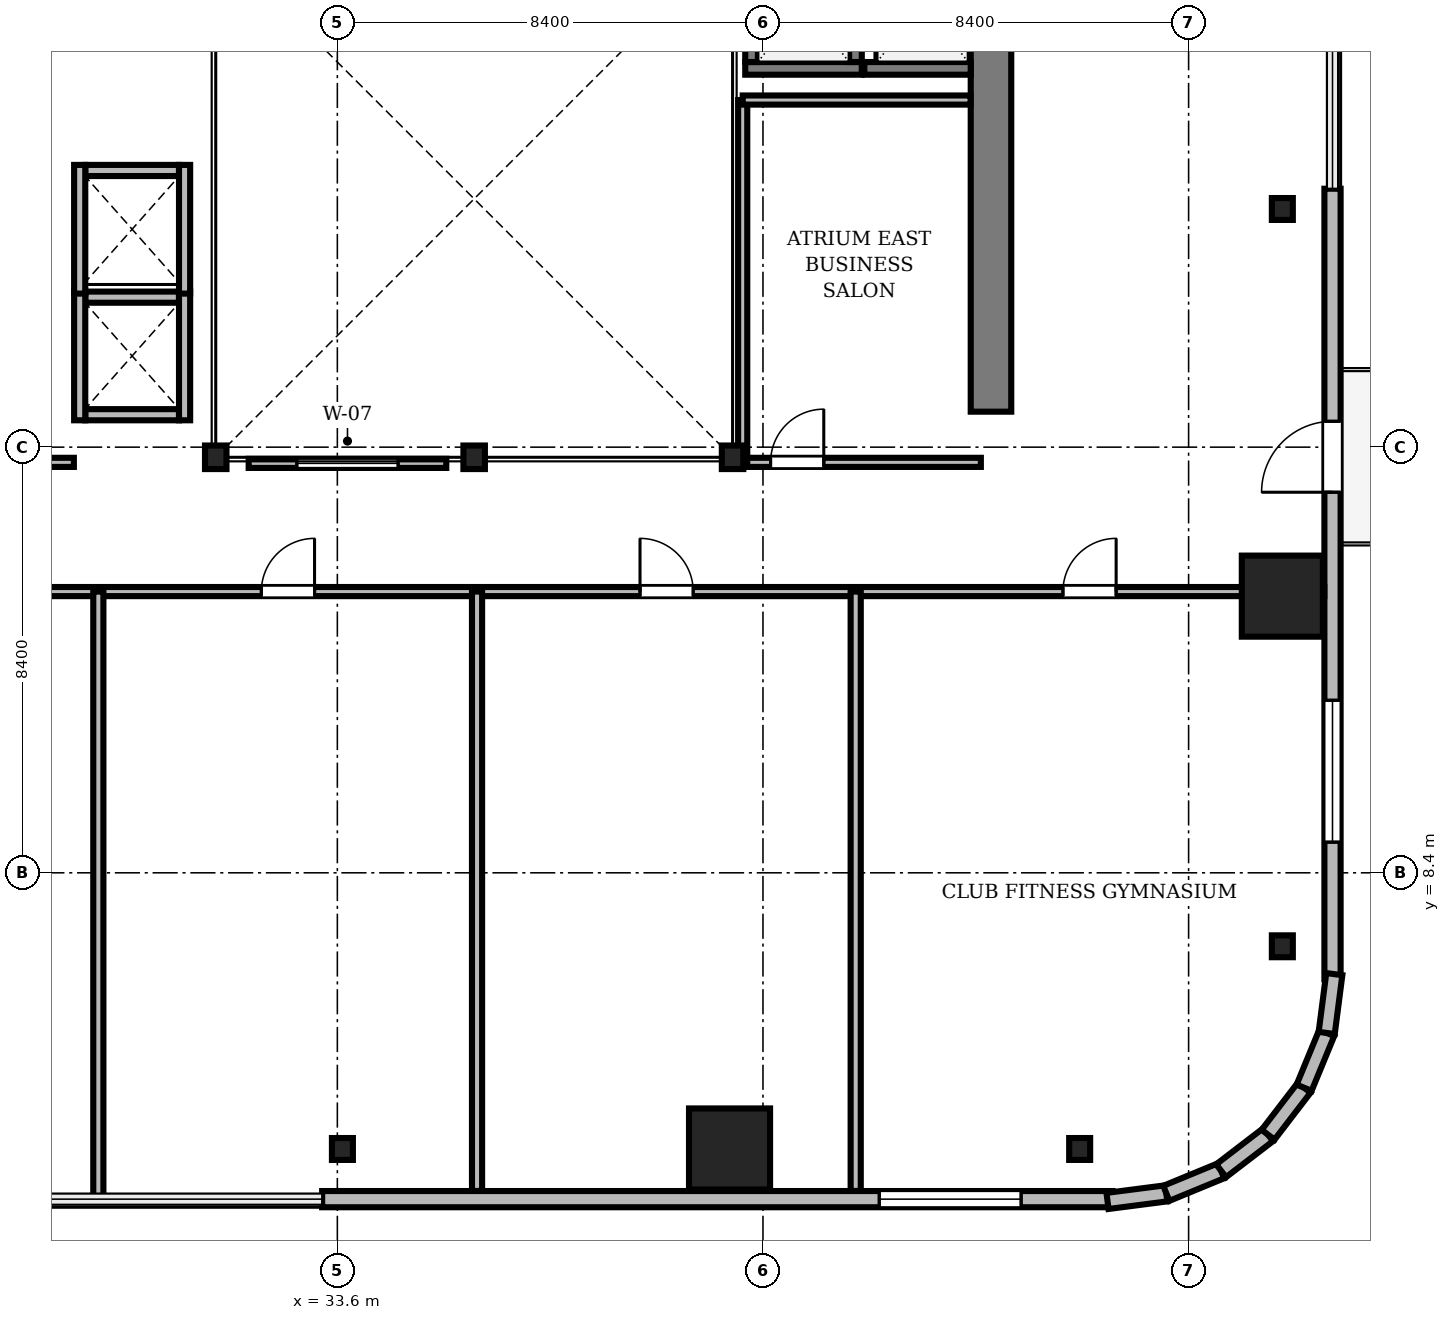
"""IFC4 building model, lengths in metres.
Left out: names, types, materials, properties, quantities, classifications, styles, units other than length and angle.
Written with IfcOpenShell. Run it as: python <this file> out.ifc"""

import sys

from ifc_helpers import new_model, si_unit, direction, frame, frame_2d, origin, origin_2d, place, context, subcontext, project, spatial, rectangle, i_section, extrude, source, transform, mapped, element, fill, save


model = new_model("IFC4")
c1 = context("Model", 3, precision=1e-05, world=origin(), true_north=direction((0.0, 1.0)))
c2 = subcontext(c1, "Body", "Model", "MODEL_VIEW")
j1 = project(units=[si_unit("LENGTHUNIT", "METRE"), si_unit("PLANEANGLEUNIT", "RADIAN")], contexts=[c1])
p1 = place(None, origin())
s1 = spatial("IfcSite", under=j1, at=p1, CompositionType="ELEMENT")
p2 = place(p1, origin())
s2 = spatial("IfcBuilding", under=s1, at=p2, CompositionType="ELEMENT")
p3 = place(p2, frame((0.0, 0.0, 118.7)))
s3 = spatial("IfcBuildingStorey", under=s2, at=p3, CompositionType="ELEMENT", Elevation=118.7)
m1 = source(origin(), c2, "Body", "SweptSolid", [
    extrude(rectangle(XDim=13.15, YDim=0.8, at=frame_2d((6.575, 0.0))), origin(), (0.0, 0.0, 1.0), 3.46),
])
p4 = place(p3, frame((46.5, 17.5, 0.0), z_axis=(0.0, 0.0, 1.0), x_axis=(0.0, 1.0, 0.0)))
e1 = element("IfcWall", 1, at=p4, inside=s3, PredefinedType="SHEAR", context=c2, shape_type="MappedRepresentation", body=[
    mapped(m1, transform((0.0, 0.0, 0.0), scale=1.0)),
])
m2 = source(origin(), c2, "Body", "SweptSolid", [
    extrude(i_section(OverallWidth=0.424, OverallDepth=0.465, WebThickness=0.035, FlangeThickness=0.056, FilletRadius=0.015, at=origin_2d()), origin(), (0.0, 0.0, 1.0), 3.46),
])
for number, where, z_axis, x_axis in (
    (2, (31.2, 16.6, 0.0), (0.0, 0.0, 1.0), (1.0, 0.0, 0.0)),
    (3, (36.3, 16.6, 0.0), (0.0, 0.0, 1.0), (1.0, 0.0, 0.0)),
    (4, (41.4, 16.6, 0.0), (0.0, 0.0, 1.0), (1.0, 0.0, 0.0)),
):
    element("IfcColumn", number, at=place(p3, frame(where, z_axis=z_axis, x_axis=x_axis)), inside=s3, PredefinedType="COLUMN", context=c2, shape_type="MappedRepresentation", body=[
        mapped(m2, transform((0.0, 0.0, 0.0), scale=1.0)),
    ])
m3 = source(origin(), c2, "Body", "SweptSolid", [
    extrude(rectangle(XDim=1.6, YDim=1.6, at=origin_2d()), origin(), (0.0, 0.0, 1.0), 3.46),
])
for number, where, z_axis, x_axis in (
    (5, (41.34, 2.95, 0.0), (0.0, 0.0, 1.0), (1.0, 0.0, 0.0)),
    (6, (52.25, 13.86, 0.0), (0.0, 0.0, 1.0), (1.0, 0.0, 0.0)),
):
    element("IfcColumn", number, at=place(p3, frame(where, z_axis=z_axis, x_axis=x_axis)), inside=s3, PredefinedType="COLUMN", context=c2, shape_type="MappedRepresentation", body=[
        mapped(m3, transform((0.0, 0.0, 0.0), scale=1.0)),
    ])
m4 = source(origin(), c2, "Body", "SweptSolid", [
    extrude(i_section(OverallWidth=0.414, OverallDepth=0.432, WebThickness=0.026, FlangeThickness=0.04, FilletRadius=0.015, at=origin_2d()), origin(), (0.0, 0.0, 1.0), 3.46),
])
for number, where, z_axis, x_axis in (
    (7, (33.7, 2.95, 0.0), (0.0, 0.0, 1.0), (1.0, 0.0, 0.0)),
    (8, (48.25, 2.95, 0.0), (0.0, 0.0, 1.0), (1.0, 0.0, 0.0)),
    (9, (52.25, 6.95, 0.0), (0.0, 0.0, 1.0), (1.0, 0.0, 0.0)),
    (10, (52.25, 21.5, 0.0), (0.0, 0.0, 1.0), (1.0, 0.0, 0.0)),
):
    element("IfcColumn", number, at=place(p3, frame(where, z_axis=z_axis, x_axis=x_axis)), inside=s3, PredefinedType="COLUMN", context=c2, shape_type="MappedRepresentation", body=[
        mapped(m4, transform((0.0, 0.0, 0.0), scale=1.0)),
    ])
m5 = source(origin(), c2, "Body", "SweptSolid", [
    extrude(rectangle(XDim=15.6, YDim=0.32, at=frame_2d((7.8, 0.0))), origin(), (0.0, 0.0, 1.0), 3.46),
])
p5 = place(p3, frame((33.3, 1.96, 0.0), z_axis=(0.0, 0.0, 1.0), x_axis=(1.0, 0.0, 0.0)))
e11 = element("IfcWall", 11, at=p5, inside=s3, PredefinedType="SOLIDWALL", context=c2, shape_type="MappedRepresentation", body=[
    mapped(m5, transform((0.0, 0.0, 0.0), scale=1.0)),
])
m6 = source(origin(), c2, "Body", "SweptSolid", [
    extrude(rectangle(XDim=2.8, YDim=2.4, at=frame_2d((1.4, 1.2))), frame((0.0, 0.17, 0.0), z_axis=(0.0, -1.0, 0.0), x_axis=(1.0, 0.0, 0.0)), (0.0, 0.0, 1.0), 0.34),
])
p6 = place(p5, frame((10.995, 0.0, 0.72)))
e12 = element("IfcOpeningElement", 12, at=p6, cuts=e11, PredefinedType="OPENING", context=c2, shape_type="MappedRepresentation", body=[
    mapped(m6, transform((0.0, 0.0, 0.0), scale=1.0)),
])
p7 = place(p3, frame((53.24, 6.3, 0.0), z_axis=(0.0, 0.0, 1.0), x_axis=(0.0, 1.0, 0.0)))
e13 = element("IfcWall", 13, at=p7, inside=s3, PredefinedType="SOLIDWALL", context=c2, shape_type="MappedRepresentation", body=[
    mapped(m5, transform((0.0, 0.0, 0.0), scale=1.0)),
])
m7 = source(origin(), c2, "Body", "SweptSolid", [
    extrude(rectangle(XDim=1.4, YDim=2.3, at=frame_2d((0.7, 1.15))), frame((0.0, 0.17, 0.0), z_axis=(0.0, -1.0, 0.0), x_axis=(1.0, 0.0, 0.0)), (0.0, 0.0, 1.0), 0.34),
])
p8 = place(p7, frame((9.61, 0.0, 0.0)))
e14 = element("IfcOpeningElement", 14, at=p8, cuts=e13, PredefinedType="OPENING", context=c2, shape_type="MappedRepresentation", body=[
    mapped(m7, transform((0.0, 0.0, 0.0), scale=1.0)),
])
p9 = place(p7, frame((2.705, 0.0, 0.72)))
e15 = element("IfcOpeningElement", 15, at=p9, cuts=e13, PredefinedType="OPENING", context=c2, shape_type="MappedRepresentation", body=[
    mapped(m6, transform((0.0, 0.0, 0.0), scale=1.0)),
])
m8 = source(origin(), c2, "Body", "SweptSolid", [
    extrude(rectangle(XDim=1.17, YDim=0.32, at=frame_2d((0.585, 0.0))), origin(), (0.0, 0.0, 1.0), 3.46),
])
p10 = place(p3, frame((48.8, 1.925, 0.0), z_axis=(0.0, 0.0, 1.0), x_axis=(0.991762485493, 0.128090485085, 0.0)))
e16 = element("IfcWall", 16, at=p10, inside=s3, PredefinedType="SOLIDWALL", context=c2, shape_type="MappedRepresentation", body=[
    mapped(m8, transform((0.0, 0.0, 0.0), scale=1.0)),
])
m9 = source(origin(), c2, "Body", "SweptSolid", [
    extrude(rectangle(XDim=1.169, YDim=0.32, at=frame_2d((0.585, 0.0))), origin(), (0.0, 0.0, 1.0), 3.46),
])
p11 = place(p3, frame((49.96, 2.074, 0.0), z_axis=(0.0, 0.0, 1.0), x_axis=(0.924479075121, 0.381232789334, 0.0)))
e17 = element("IfcWall", 17, at=p11, inside=s3, PredefinedType="SOLIDWALL", context=c2, shape_type="MappedRepresentation", body=[
    mapped(m9, transform((0.0, 0.0, 0.0), scale=1.0)),
])
m10 = source(origin(), c2, "Body", "SweptSolid", [
    extrude(rectangle(XDim=1.169, YDim=0.32, at=frame_2d((0.584, 0.0))), origin(), (0.0, 0.0, 1.0), 3.46),
])
p12 = place(p3, frame((51.041, 2.52, 0.0), z_axis=(0.0, 0.0, 1.0), x_axis=(0.793663520347, 0.608356981114, 0.0)))
e18 = element("IfcWall", 18, at=p12, inside=s3, PredefinedType="SOLIDWALL", context=c2, shape_type="MappedRepresentation", body=[
    mapped(m10, transform((0.0, 0.0, 0.0), scale=1.0)),
])
m11 = source(origin(), c2, "Body", "SweptSolid", [
    extrude(rectangle(XDim=1.169, YDim=0.32, at=frame_2d((0.584, 0.0))), origin(), (0.0, 0.0, 1.0), 3.46),
])
for number, where, z_axis, x_axis in (
    (19, (51.969, 3.231, 0.0), (0.0, 0.0, 1.0), (0.608, 0.794, 0.0)),
    (20, (52.68, 4.159, 0.0), (0.0, 0.0, 1.0), (0.381, 0.925, 0.0)),
):
    element("IfcWall", number, at=place(p3, frame(where, z_axis=z_axis, x_axis=x_axis)), inside=s3, PredefinedType="SOLIDWALL", context=c2, shape_type="MappedRepresentation", body=[
        mapped(m11, transform((0.0, 0.0, 0.0), scale=1.0)),
    ])
m12 = source(origin(), c2, "Body", "SweptSolid", [
    extrude(rectangle(XDim=1.171, YDim=0.32, at=frame_2d((0.585, 0.0))), origin(), (0.0, 0.0, 1.0), 3.46),
])
p13 = place(p3, frame((53.125, 5.24, 0.0), z_axis=(0.0, 0.0, 1.0), x_axis=(0.128269133229, 0.991739395941, 0.0)))
e21 = element("IfcWall", 21, at=p13, inside=s3, PredefinedType="SOLIDWALL", context=c2, shape_type="MappedRepresentation", body=[
    mapped(m12, transform((0.0, 0.0, 0.0), scale=1.0)),
])
m13 = source(origin(), c2, "Body", "SweptSolid", [
    extrude(rectangle(XDim=1.85, YDim=0.22, at=frame_2d((0.925, 0.0))), origin(), (0.0, 0.0, 1.0), 3.46),
])
for number, where, z_axis, x_axis in (
    (22, (28.625, 17.44, 0.0), (0.0, 0.0, 1.0), (1.0, 0.0, 0.0)),
    (23, (28.625, 19.76, 0.0), (0.0, 0.0, 1.0), (1.0, 0.0, 0.0)),
):
    element("IfcWall", number, at=place(p3, frame(where, z_axis=z_axis, x_axis=x_axis)), inside=s3, PredefinedType="SOLIDWALL", context=c2, shape_type="MappedRepresentation", body=[
        mapped(m13, transform((0.0, 0.0, 0.0), scale=1.0)),
    ])
m14 = source(origin(), c2, "Body", "SweptSolid", [
    extrude(rectangle(XDim=2.54, YDim=0.22, at=frame_2d((1.27, 0.0))), origin(), (0.0, 0.0, 1.0), 3.46),
])
for number, where, z_axis, x_axis in (
    (24, (28.515, 17.33, 0.0), (0.0, 0.0, 1.0), (0.0, 1.0, 0.0)),
    (25, (30.585, 17.33, 0.0), (0.0, 0.0, 1.0), (0.0, 1.0, 0.0)),
):
    element("IfcWall", number, at=place(p3, frame(where, z_axis=z_axis, x_axis=x_axis)), inside=s3, PredefinedType="SOLIDWALL", context=c2, shape_type="MappedRepresentation", body=[
        mapped(m14, transform((0.0, 0.0, 0.0), scale=1.0)),
    ])
p14 = place(p3, frame((28.625, 22.26, 0.0), z_axis=(0.0, 0.0, 1.0), x_axis=(1.0, 0.0, 0.0)))
e26 = element("IfcWall", 26, at=p14, inside=s3, PredefinedType="SOLIDWALL", context=c2, shape_type="MappedRepresentation", body=[
    mapped(m13, transform((0.0, 0.0, 0.0), scale=1.0)),
])
for number, where, z_axis, x_axis in (
    (27, (28.515, 19.83, 0.0), (0.0, 0.0, 1.0), (0.0, 1.0, 0.0)),
    (28, (30.585, 19.83, 0.0), (0.0, 0.0, 1.0), (0.0, 1.0, 0.0)),
):
    element("IfcWall", number, at=place(p3, frame(where, z_axis=z_axis, x_axis=x_axis)), inside=s3, PredefinedType="SOLIDWALL", context=c2, shape_type="MappedRepresentation", body=[
        mapped(m14, transform((0.0, 0.0, 0.0), scale=1.0)),
    ])
m15 = source(origin(), c2, "Body", "SweptSolid", [
    extrude(rectangle(XDim=2.3, YDim=0.25, at=frame_2d((1.15, 0.0))), origin(), (0.0, 0.0, 1.0), 3.46),
])
for number, where, z_axis, x_axis in (
    (29, (41.65, 24.275, 0.0), (0.0, 0.0, 1.0), (1.0, 0.0, 0.0)),
    (30, (41.775, 24.4, 0.0), (0.0, 0.0, 1.0), (0.0, 1.0, 0.0)),
    (31, (43.825, 24.4, 0.0), (0.0, 0.0, 1.0), (0.0, 1.0, 0.0)),
):
    element("IfcWall", number, at=place(p3, frame(where, z_axis=z_axis, x_axis=x_axis)), inside=s3, PredefinedType="SOLIDWALL", context=c2, shape_type="MappedRepresentation", body=[
        mapped(m15, transform((0.0, 0.0, 0.0), scale=1.0)),
    ])
m16 = source(origin(), c2, "Body", "SweptSolid", [
    extrude(rectangle(XDim=2.1, YDim=0.25, at=frame_2d((1.05, 0.0))), origin(), (0.0, 0.0, 1.0), 3.46),
])
p15 = place(p3, frame((44.0, 24.275, 0.0), z_axis=(0.0, 0.0, 1.0), x_axis=(1.0, 0.0, 0.0)))
e32 = element("IfcWall", 32, at=p15, inside=s3, PredefinedType="SOLIDWALL", context=c2, shape_type="MappedRepresentation", body=[
    mapped(m16, transform((0.0, 0.0, 0.0), scale=1.0)),
])
m17 = source(origin(), c2, "Body", "SweptSolid", [
    extrude(rectangle(XDim=46.156, YDim=0.18, at=frame_2d((23.078, 0.0))), origin(), (0.0, 0.0, 1.0), 2.702),
])
p16 = place(p3, frame((6.922, 13.95, 0.0), z_axis=(0.0, 0.0, 1.0), x_axis=(1.0, 0.0, 0.0)))
e33 = element("IfcWall", 33, at=p16, inside=s3, PredefinedType="PARTITIONING", context=c2, shape_type="MappedRepresentation", body=[
    mapped(m17, transform((0.0, 0.0, 0.0), scale=1.0)),
])
m18 = source(origin(), c2, "Body", "SweptSolid", [
    extrude(rectangle(XDim=1.05, YDim=2.2, at=frame_2d((0.525, 1.1))), frame((0.0, 0.1, 0.0), z_axis=(0.0, -1.0, 0.0), x_axis=(1.0, 0.0, 0.0)), (0.0, 0.0, 1.0), 0.2),
])
p17 = place(p16, frame((14.338, 0.0, 0.0)))
e34 = element("IfcOpeningElement", 34, at=p17, cuts=e33, PredefinedType="OPENING", context=c2, shape_type="MappedRepresentation", body=[
    mapped(m18, transform((0.0, 0.0, 0.0), scale=1.0)),
])
p18 = place(p16, frame((18.305, 0.0, 0.0)))
e35 = element("IfcOpeningElement", 35, at=p18, cuts=e33, PredefinedType="OPENING", context=c2, shape_type="MappedRepresentation", body=[
    mapped(m18, transform((0.0, 0.0, 0.0), scale=1.0)),
])
p19 = place(p16, frame((25.178, 0.0, 0.0)))
e36 = element("IfcOpeningElement", 36, at=p19, cuts=e33, PredefinedType="OPENING", context=c2, shape_type="MappedRepresentation", body=[
    mapped(m18, transform((0.0, 0.0, 0.0), scale=1.0)),
])
p20 = place(p16, frame((32.651, 0.0, 0.0)))
e37 = element("IfcOpeningElement", 37, at=p20, cuts=e33, PredefinedType="OPENING", context=c2, shape_type="MappedRepresentation", body=[
    mapped(m18, transform((0.0, 0.0, 0.0), scale=1.0)),
])
p21 = place(p16, frame((40.998, 0.0, 0.0)))
e38 = element("IfcOpeningElement", 38, at=p21, cuts=e33, PredefinedType="OPENING", context=c2, shape_type="MappedRepresentation", body=[
    mapped(m18, transform((0.0, 0.0, 0.0), scale=1.0)),
])
m19 = source(origin(), c2, "Body", "SweptSolid", [
    extrude(rectangle(XDim=4.7, YDim=0.18, at=frame_2d((2.35, 0.0))), origin(), (0.0, 0.0, 1.0), 2.852),
])
p22 = place(p3, frame((41.6, 16.5, 0.0), z_axis=(0.0, 0.0, 1.0), x_axis=(1.0, 0.0, 0.0)))
e39 = element("IfcWall", 39, at=p22, inside=s3, PredefinedType="PARTITIONING", context=c2, shape_type="MappedRepresentation", body=[
    mapped(m19, transform((0.0, 0.0, 0.0), scale=1.0)),
])
p23 = place(p22, frame((0.55, 0.0, 0.0)))
e40 = element("IfcOpeningElement", 40, at=p23, cuts=e39, PredefinedType="OPENING", context=c2, shape_type="MappedRepresentation", body=[
    mapped(m18, transform((0.0, 0.0, 0.0), scale=1.0)),
])
m20 = source(origin(), c2, "Body", "SweptSolid", [
    extrude(rectangle(XDim=12.02, YDim=0.2, at=frame_2d((6.01, 0.0))), origin(), (0.0, 0.0, 1.0), 2.702),
])
p24 = place(p3, frame((28.883, 1.93, 0.0), z_axis=(0.0, 0.0, 1.0), x_axis=(0.0, 1.0, 0.0)))
e41 = element("IfcWall", 41, at=p24, inside=s3, PredefinedType="PARTITIONING", context=c2, shape_type="MappedRepresentation", body=[
    mapped(m20, transform((0.0, 0.0, 0.0), scale=1.0)),
])
m21 = source(origin(), c2, "Body", "SweptSolid", [
    extrude(rectangle(XDim=11.828, YDim=0.2, at=frame_2d((5.914, 0.0))), origin(), (0.0, 0.0, 1.0), 2.702),
])
for number, where, z_axis, x_axis in (
    (42, (36.357, 2.122, 0.0), (0.0, 0.0, 1.0), (0.0, 1.0, 0.0)),
    (43, (43.83, 2.122, 0.0), (0.0, 0.0, 1.0), (0.0, 1.0, 0.0)),
):
    element("IfcWall", number, at=place(p3, frame(where, z_axis=z_axis, x_axis=x_axis)), inside=s3, PredefinedType="PARTITIONING", context=c2, shape_type="MappedRepresentation", body=[
        mapped(m21, transform((0.0, 0.0, 0.0), scale=1.0)),
    ])
m22 = source(origin(), c2, "Body", "SweptSolid", [
    extrude(rectangle(XDim=7.15, YDim=0.18, at=frame_2d((3.575, 0.0))), origin(), (0.0, 0.0, 1.0), 2.852),
])
p25 = place(p3, frame((41.6, 16.5, 0.0), z_axis=(0.0, 0.0, 1.0), x_axis=(0.0, 1.0, 0.0)))
e44 = element("IfcWall", 44, at=p25, inside=s3, PredefinedType="PARTITIONING", context=c2, shape_type="MappedRepresentation", body=[
    mapped(m22, transform((0.0, 0.0, 0.0), scale=1.0)),
])
m23 = source(origin(), c2, "Body", "SweptSolid", [
    extrude(rectangle(XDim=7.04, YDim=0.18, at=frame_2d((3.52, 0.0))), origin(), (0.0, 0.0, 1.0), 3.46),
])
p26 = place(p3, frame((21.36, 16.5, 0.0), z_axis=(0.0, 0.0, 1.0), x_axis=(1.0, 0.0, 0.0)))
e45 = element("IfcWall", 45, at=p26, inside=s3, PredefinedType="PARTITIONING", context=c2, shape_type="MappedRepresentation", body=[
    mapped(m23, transform((0.0, 0.0, 0.0), scale=1.0)),
])
m24 = source(origin(), c2, "Body", "SweptSolid", [
    extrude(rectangle(XDim=4.498, YDim=0.18, at=frame_2d((2.249, 0.0))), origin(), (0.0, 0.0, 1.0), 3.46),
])
p27 = place(p3, frame((41.6, 23.65, 0.0), z_axis=(0.0, 0.0, 1.0), x_axis=(1.0, 0.0, 0.0)))
e46 = element("IfcWall", 46, at=p27, inside=s3, PredefinedType="PARTITIONING", context=c2, shape_type="MappedRepresentation", body=[
    mapped(m24, transform((0.0, 0.0, 0.0), scale=1.0)),
])
m25 = source(origin(), c2, "Body", "SweptSolid", [
    extrude(rectangle(XDim=3.9, YDim=0.18, at=frame_2d((1.95, 0.0))), origin(), (0.0, 0.0, 1.0), 3.002),
])
p28 = place(p3, frame((31.85, 16.48, 0.0), z_axis=(0.0, 0.0, 1.0), x_axis=(1.0, 0.0, 0.0)))
e47 = element("IfcWall", 47, at=p28, inside=s3, PredefinedType="PARTITIONING", context=c2, shape_type="MappedRepresentation", body=[
    mapped(m25, transform((0.0, 0.0, 0.0), scale=1.0)),
])
m26 = source(origin(), c2, "Body", "SweptSolid", [
    extrude(rectangle(XDim=2.0, YDim=1.9, at=frame_2d((1.0, 0.95))), frame((0.0, 0.1, 0.0), z_axis=(0.0, -1.0, 0.0), x_axis=(1.0, 0.0, 0.0)), (0.0, 0.0, 1.0), 0.2),
])
p29 = place(p28, frame((0.95, 0.0, 0.55)))
e48 = element("IfcOpeningElement", 48, at=p29, cuts=e47, PredefinedType="OPENING", context=c2, shape_type="MappedRepresentation", body=[
    mapped(m26, transform((0.0, 0.0, 0.0), scale=1.0)),
])
m27 = source(origin(), c2, "Body", "SweptSolid", [
    extrude(rectangle(XDim=2.8, YDim=2.4, at=frame_2d((1.4, 1.2))), frame((0.0, 0.03, 0.0), z_axis=(0.0, -1.0, 0.0), x_axis=(1.0, 0.0, 0.0)), (0.0, 0.0, 1.0), 0.06),
])
p30 = place(p6, origin())
e49 = element("IfcWindow", 49, at=p30, inside=s3, PartitioningType="SINGLE_PANEL", PredefinedType="WINDOW", context=c2, shape_type="MappedRepresentation", body=[
    mapped(m27, transform((0.0, 0.0, 0.0), scale=1.0)),
])
fill(e12, e49)
m28 = source(origin(), c2, "Body", "SweptSolid", [
    extrude(rectangle(XDim=1.4, YDim=2.3, at=frame_2d((0.7, 1.15))), frame((0.0, 0.025, 0.0), z_axis=(0.0, -1.0, 0.0), x_axis=(1.0, 0.0, 0.0)), (0.0, 0.0, 1.0), 0.05),
])
p31 = place(p8, frame((1.4, 0.0, 0.0), z_axis=(0.0, 0.0, 1.0), x_axis=(-1.0, 0.0, 0.0)))
e50 = element("IfcDoor", 50, at=p31, inside=s3, OperationType="DOUBLE_DOOR_SLIDING", PredefinedType="DOOR", context=c2, shape_type="MappedRepresentation", body=[
    mapped(m28, transform((0.0, 0.0, 0.0), scale=1.0)),
])
fill(e14, e50)
p32 = place(p9, origin())
e51 = element("IfcWindow", 51, at=p32, inside=s3, PartitioningType="SINGLE_PANEL", PredefinedType="WINDOW", context=c2, shape_type="MappedRepresentation", body=[
    mapped(m27, transform((0.0, 0.0, 0.0), scale=1.0)),
])
fill(e15, e51)
m29 = source(origin(), c2, "Body", "SweptSolid", [
    extrude(rectangle(XDim=1.05, YDim=2.2, at=frame_2d((0.525, 1.1))), frame((0.0, 0.025, 0.0), z_axis=(0.0, -1.0, 0.0), x_axis=(1.0, 0.0, 0.0)), (0.0, 0.0, 1.0), 0.05),
])
p33 = place(p19, origin())
e52 = element("IfcDoor", 52, at=p33, inside=s3, OperationType="SINGLE_SWING_RIGHT", PredefinedType="DOOR", context=c2, shape_type="MappedRepresentation", body=[
    mapped(m29, transform((0.0, 0.0, 0.0), scale=1.0)),
])
fill(e36, e52)
p34 = place(p20, origin())
e53 = element("IfcDoor", 53, at=p34, inside=s3, OperationType="SINGLE_SWING_LEFT", PredefinedType="DOOR", context=c2, shape_type="MappedRepresentation", body=[
    mapped(m29, transform((0.0, 0.0, 0.0), scale=1.0)),
])
fill(e37, e53)
p35 = place(p21, origin())
e54 = element("IfcDoor", 54, at=p35, inside=s3, OperationType="SINGLE_SWING_RIGHT", PredefinedType="DOOR", context=c2, shape_type="MappedRepresentation", body=[
    mapped(m29, transform((0.0, 0.0, 0.0), scale=1.0)),
])
fill(e38, e54)
p36 = place(p23, origin())
e55 = element("IfcDoor", 55, at=p36, inside=s3, OperationType="SINGLE_SWING_RIGHT", PredefinedType="DOOR", context=c2, shape_type="MappedRepresentation", body=[
    mapped(m29, transform((0.0, 0.0, 0.0), scale=1.0)),
])
fill(e40, e55)
m30 = source(origin(), c2, "Body", "SweptSolid", [
    extrude(rectangle(XDim=2.0, YDim=1.9, at=frame_2d((1.0, 0.95))), frame((0.0, 0.03, 0.0), z_axis=(0.0, -1.0, 0.0), x_axis=(1.0, 0.0, 0.0)), (0.0, 0.0, 1.0), 0.06),
])
p37 = place(p29, origin())
e56 = element("IfcWindow", 56, at=p37, inside=s3, PartitioningType="SINGLE_PANEL", PredefinedType="WINDOW", context=c2, shape_type="MappedRepresentation", body=[
    mapped(m30, transform((0.0, 0.0, 0.0), scale=1.0)),
])
fill(e48, e56)
save(model, sys.argv[1])
